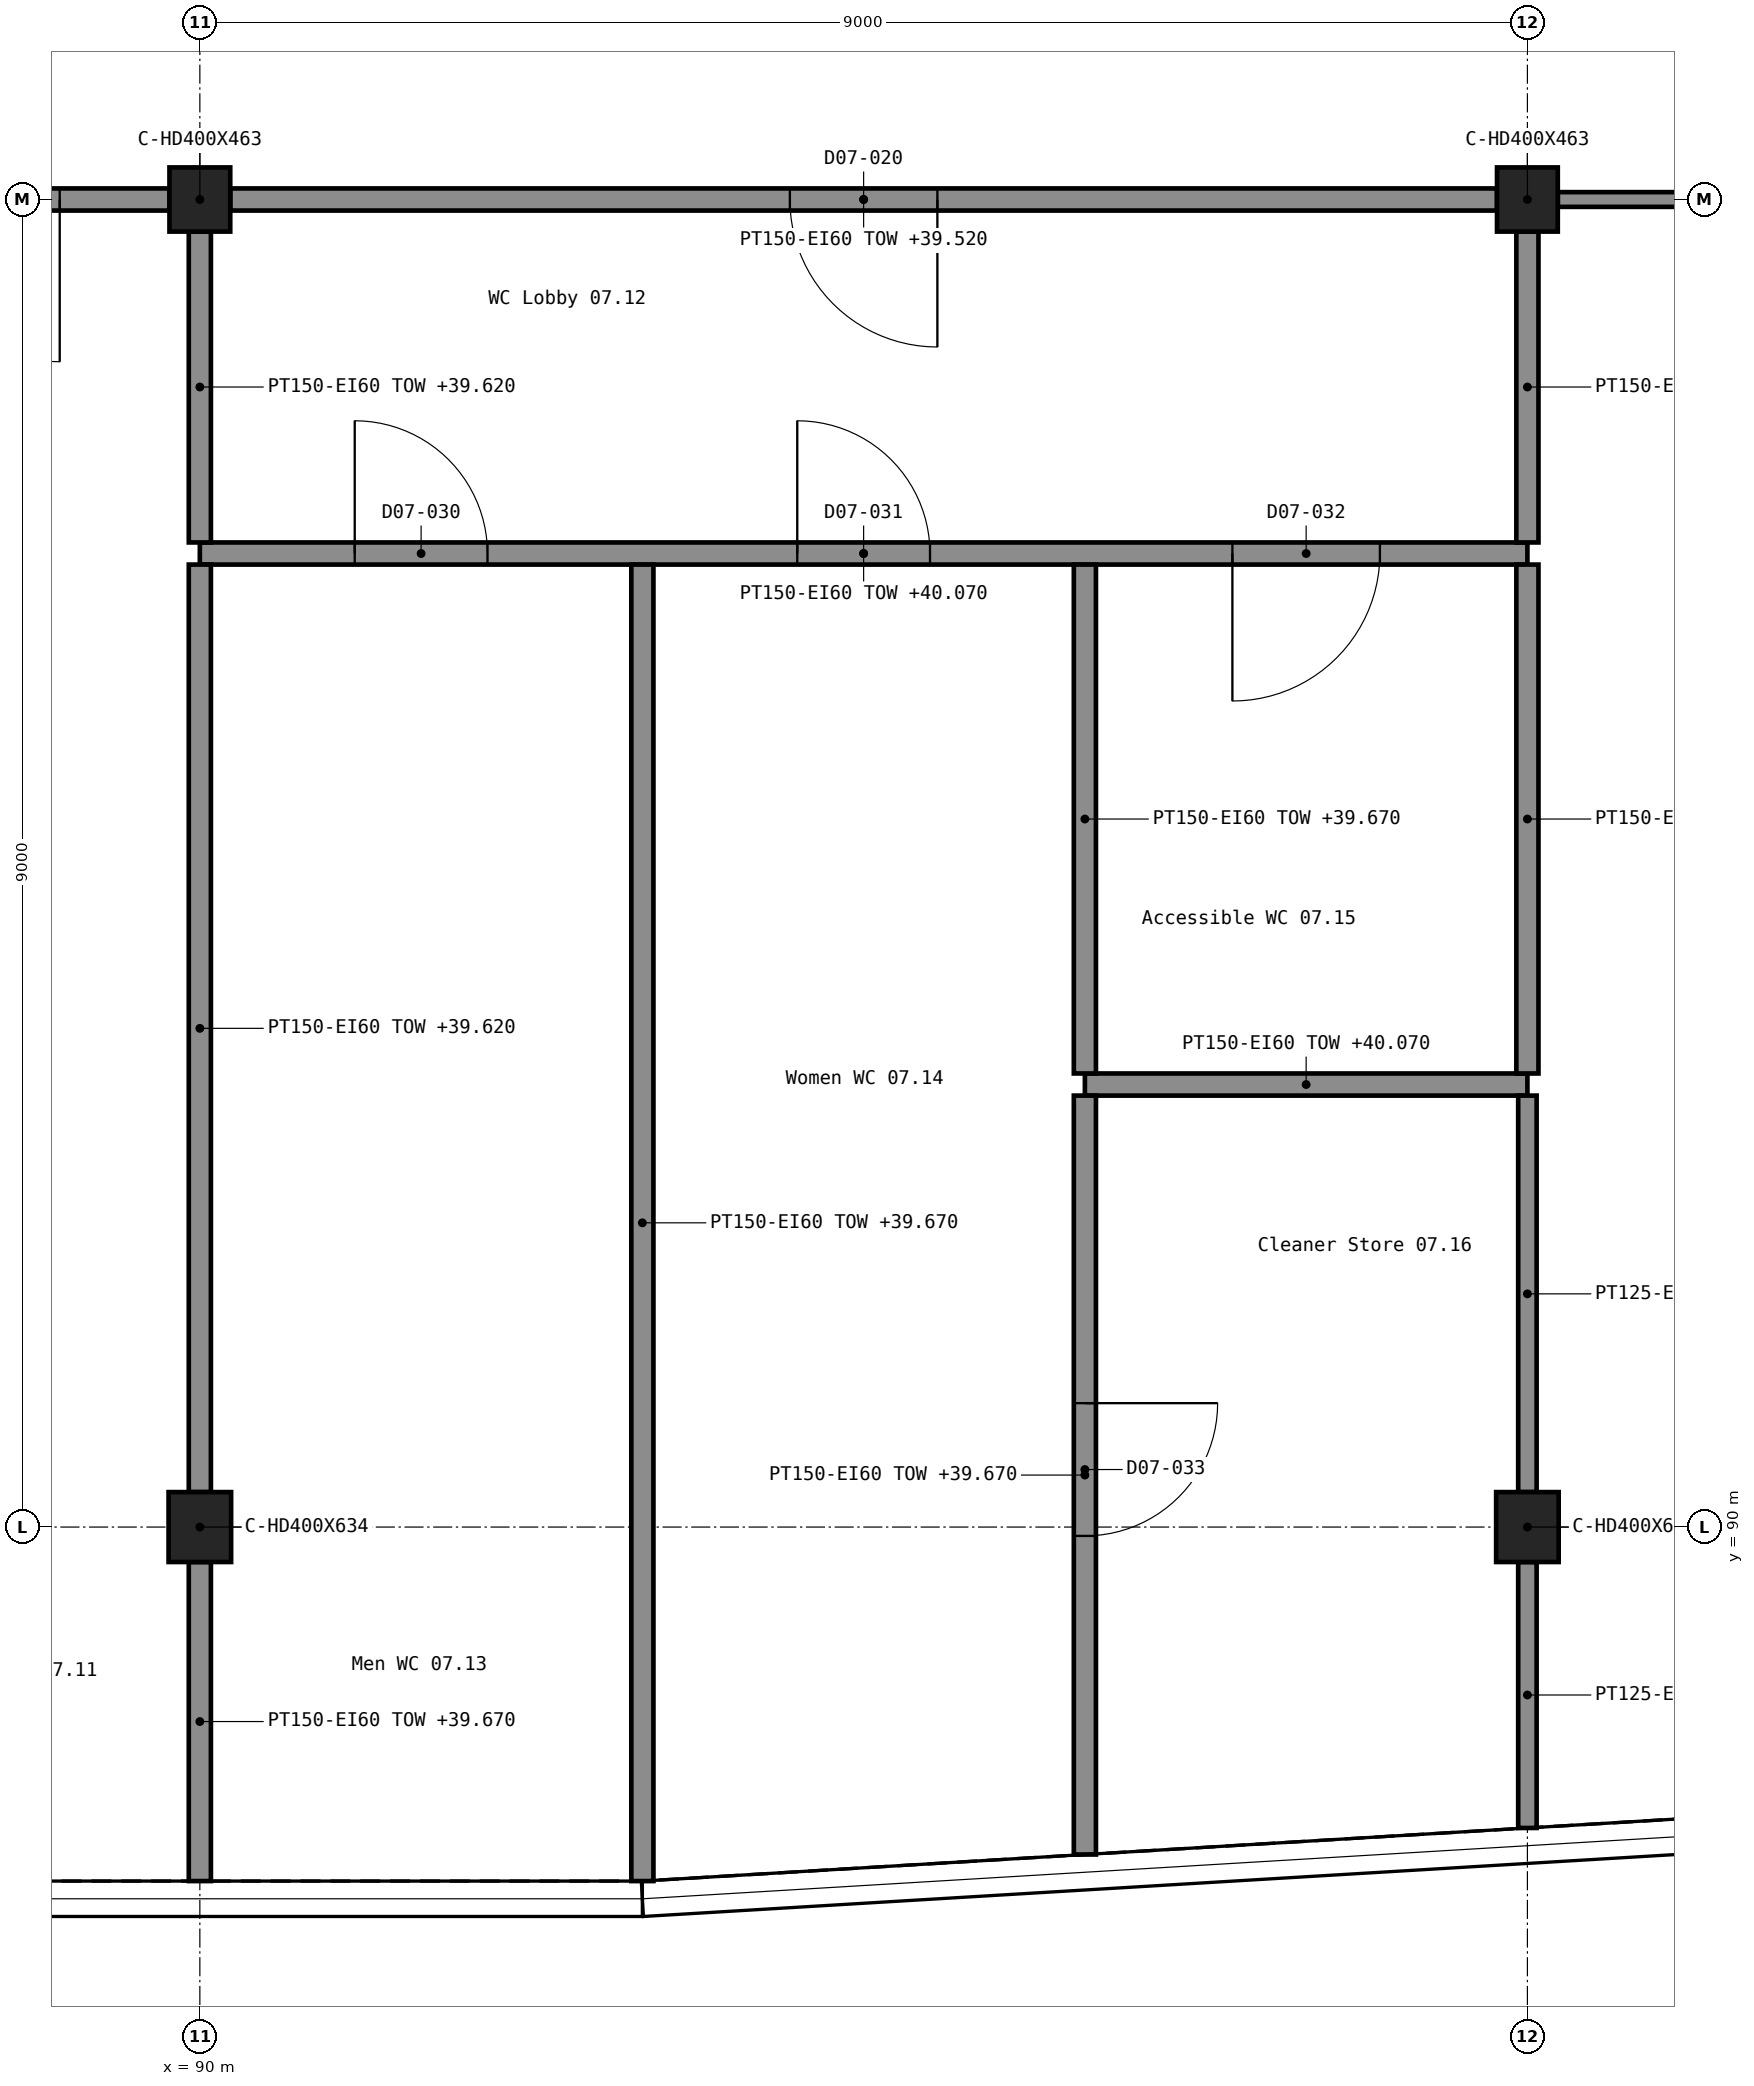
"""IFC4 building model, lengths in metres.
Left out: names, types, materials, properties, quantities, classifications, styles, units other than length and angle.
Written with IfcOpenShell. Run it as: python <this file> out.ifc"""

import sys

from ifc_helpers import new_model, si_unit, direction, frame, frame_2d, origin, origin_2d, place, context, subcontext, project, spatial, rectangle, i_section, extrude, element, fill, save


model = new_model("IFC4")
c1 = context("Model", 3, precision=1e-05, world=origin(), true_north=direction((0.0, 1.0)))
c2 = subcontext(c1, "Body", "Model", "MODEL_VIEW")
j1 = project(units=[si_unit("LENGTHUNIT", "METRE"), si_unit("PLANEANGLEUNIT", "RADIAN")], contexts=[c1])
p1 = place(None, origin())
s1 = spatial("IfcSite", under=j1, at=p1, CompositionType="ELEMENT")
p2 = place(p1, origin())
s2 = spatial("IfcBuilding", under=s1, at=p2, CompositionType="ELEMENT")
p3 = place(p2, frame((0.0, 0.0, 36.3)))
s3 = spatial("IfcBuildingStorey", under=s2, at=p3, CompositionType="ELEMENT", Elevation=36.3)
for number, where, z_axis, x_axis in (
    (1, (90.0, 90.0, 0.0), (0.0, 0.0, 1.0), (1.0, 0.0, 0.0)),
    (2, (99.0, 90.0, 0.0), (0.0, 0.0, 1.0), (1.0, 0.0, 0.0)),
):
    element("IfcColumn", number, at=place(p3, frame(where, z_axis=z_axis, x_axis=x_axis)), inside=s3, PredefinedType="COLUMN", context=c2, shape_type="SweptSolid", body=[
        extrude(i_section(OverallWidth=0.424, OverallDepth=0.474, WebThickness=0.048, FlangeThickness=0.077, FilletRadius=0.015, at=origin_2d()), origin(), (0.0, 0.0, 1.0), 3.9),
    ])
for number, where, z_axis, x_axis in (
    (3, (90.0, 99.0, 0.0), (0.0, 0.0, 1.0), (1.0, 0.0, 0.0)),
    (4, (99.0, 99.0, 0.0), (0.0, 0.0, 1.0), (1.0, 0.0, 0.0)),
):
    element("IfcColumn", number, at=place(p3, frame(where, z_axis=z_axis, x_axis=x_axis)), inside=s3, PredefinedType="COLUMN", context=c2, shape_type="SweptSolid", body=[
        extrude(i_section(OverallWidth=0.412, OverallDepth=0.435, WebThickness=0.036, FlangeThickness=0.057, FilletRadius=0.015, at=origin_2d()), origin(), (0.0, 0.0, 1.0), 3.9),
    ])
p4 = place(p3, frame((96.0, 93.0, 0.0), z_axis=(0.0, 0.0, 1.0), x_axis=(1.0, 0.0, 0.0)))
e5 = element("IfcWall", 5, at=p4, inside=s3, PredefinedType="PARTITIONING", context=c2, shape_type="SweptSolid", body=[
    extrude(rectangle(XDim=3.0, YDim=0.15, at=frame_2d((1.5, 0.0))), origin(), (0.0, 0.0, 1.0), 3.77),
])
p5 = place(p3, frame((90.0, 96.6, 0.0), z_axis=(0.0, 0.0, 1.0), x_axis=(1.0, 0.0, 0.0)))
e6 = element("IfcWall", 6, at=p5, inside=s3, PredefinedType="PARTITIONING", context=c2, shape_type="SweptSolid", body=[
    extrude(rectangle(XDim=9.0, YDim=0.15, at=frame_2d((4.5, 0.0))), origin(), (0.0, 0.0, 1.0), 3.77),
])
p6 = place(p5, frame((1.05, 0.0, 0.0)))
e7 = element("IfcOpeningElement", 7, at=p6, cuts=e6, PredefinedType="OPENING", context=c2, shape_type="SweptSolid", body=[
    extrude(rectangle(XDim=0.9, YDim=2.1, at=frame_2d((0.45, 1.05))), frame((0.0, 0.086, 0.0), z_axis=(0.0, -1.0, 0.0), x_axis=(1.0, 0.0, 0.0)), (0.0, 0.0, 1.0), 0.172),
])
p7 = place(p5, frame((4.05, 0.0, 0.0)))
e8 = element("IfcOpeningElement", 8, at=p7, cuts=e6, PredefinedType="OPENING", context=c2, shape_type="SweptSolid", body=[
    extrude(rectangle(XDim=0.9, YDim=2.1, at=frame_2d((0.45, 1.05))), frame((0.0, 0.086, 0.0), z_axis=(0.0, -1.0, 0.0), x_axis=(1.0, 0.0, 0.0)), (0.0, 0.0, 1.0), 0.172),
])
p8 = place(p5, frame((7.0, 0.0, 0.0)))
e9 = element("IfcOpeningElement", 9, at=p8, cuts=e6, PredefinedType="OPENING", context=c2, shape_type="SweptSolid", body=[
    extrude(rectangle(XDim=1.0, YDim=2.1, at=frame_2d((0.5, 1.05))), frame((0.0, 0.086, 0.0), z_axis=(0.0, -1.0, 0.0), x_axis=(1.0, 0.0, 0.0)), (0.0, 0.0, 1.0), 0.172),
])
p9 = place(p3, frame((99.206, 99.0, 0.0), z_axis=(0.0, 0.0, 1.0), x_axis=(1.0, 0.0, 0.0)))
e10 = element("IfcWall", 10, at=p9, inside=s3, PredefinedType="PARTITIONING", context=c2, shape_type="SweptSolid", body=[
    extrude(rectangle(XDim=5.794, YDim=0.1, at=frame_2d((2.897, 0.0))), origin(), (0.0, 0.0, 1.0), 3.22),
])
p10 = place(p9, frame((2.294, 0.0, 0.0)))
e11 = element("IfcOpeningElement", 11, at=p10, cuts=e10, PredefinedType="OPENING", context=c2, shape_type="SweptSolid", body=[
    extrude(rectangle(XDim=1.0, YDim=2.1, at=frame_2d((0.5, 1.05))), frame((0.0, 0.061, 0.0), z_axis=(0.0, -1.0, 0.0), x_axis=(1.0, 0.0, 0.0)), (0.0, 0.0, 1.0), 0.122),
])
p11 = place(p3, frame((81.206, 99.0, 0.0), z_axis=(0.0, 0.0, 1.0), x_axis=(1.0, 0.0, 0.0)))
e12 = element("IfcWall", 12, at=p11, inside=s3, PredefinedType="PARTITIONING", context=c2, shape_type="SweptSolid", body=[
    extrude(rectangle(XDim=8.588, YDim=0.15, at=frame_2d((4.294, 0.0))), origin(), (0.0, 0.0, 1.0), 3.22),
])
p12 = place(p11, frame((1.369, 0.0, 0.0)))
e13 = element("IfcOpeningElement", 13, at=p12, cuts=e12, PredefinedType="OPENING", context=c2, shape_type="SweptSolid", body=[
    extrude(rectangle(XDim=1.1, YDim=2.4, at=frame_2d((0.55, 1.2))), frame((0.0, 0.086, 0.0), z_axis=(0.0, -1.0, 0.0), x_axis=(1.0, 0.0, 0.0)), (0.0, 0.0, 1.0), 0.172),
])
p13 = place(p11, frame((6.744, 0.0, 0.0)))
e14 = element("IfcOpeningElement", 14, at=p13, cuts=e12, PredefinedType="OPENING", context=c2, shape_type="SweptSolid", body=[
    extrude(rectangle(XDim=1.1, YDim=2.4, at=frame_2d((0.55, 1.2))), frame((0.0, 0.086, 0.0), z_axis=(0.0, -1.0, 0.0), x_axis=(1.0, 0.0, 0.0)), (0.0, 0.0, 1.0), 0.172),
])
p14 = place(p3, frame((90.206, 99.0, 0.0), z_axis=(0.0, 0.0, 1.0), x_axis=(1.0, 0.0, 0.0)))
e15 = element("IfcWall", 15, at=p14, inside=s3, PredefinedType="PARTITIONING", context=c2, shape_type="SweptSolid", body=[
    extrude(rectangle(XDim=8.588, YDim=0.15, at=frame_2d((4.294, 0.0))), origin(), (0.0, 0.0, 1.0), 3.22),
])
p15 = place(p14, frame((3.794, 0.0, 0.0)))
e16 = element("IfcOpeningElement", 16, at=p15, cuts=e15, PredefinedType="OPENING", context=c2, shape_type="SweptSolid", body=[
    extrude(rectangle(XDim=1.0, YDim=2.1, at=frame_2d((0.5, 1.05))), frame((0.0, 0.086, 0.0), z_axis=(0.0, -1.0, 0.0), x_axis=(1.0, 0.0, 0.0)), (0.0, 0.0, 1.0), 0.172),
])
p16 = place(p3, frame((90.0, 87.6, 0.0), z_axis=(0.0, 0.0, 1.0), x_axis=(0.0, 1.0, 0.0)))
e17 = element("IfcWall", 17, at=p16, inside=s3, PredefinedType="PARTITIONING", context=c2, shape_type="SweptSolid", body=[
    extrude(rectangle(XDim=2.163, YDim=0.15, at=frame_2d((1.082, 0.0))), origin(), (0.0, 0.0, 1.0), 3.37),
])
p17 = place(p3, frame((90.0, 90.237, 0.0), z_axis=(0.0, 0.0, 1.0), x_axis=(0.0, 1.0, 0.0)))
e18 = element("IfcWall", 18, at=p17, inside=s3, PredefinedType="PARTITIONING", context=c2, shape_type="SweptSolid", body=[
    extrude(rectangle(XDim=6.288, YDim=0.15, at=frame_2d((3.144, 0.0))), origin(), (0.0, 0.0, 1.0), 3.32),
])
p18 = place(p3, frame((90.0, 96.675, 0.0), z_axis=(0.0, 0.0, 1.0), x_axis=(0.0, 1.0, 0.0)))
e19 = element("IfcWall", 19, at=p18, inside=s3, PredefinedType="PARTITIONING", context=c2, shape_type="SweptSolid", body=[
    extrude(rectangle(XDim=2.107, YDim=0.15, at=frame_2d((1.054, 0.0))), origin(), (0.0, 0.0, 1.0), 3.32),
])
p19 = place(p3, frame((93.0, 87.6, 0.0), z_axis=(0.0, 0.0, 1.0), x_axis=(0.0, 1.0, 0.0)))
e20 = element("IfcWall", 20, at=p19, inside=s3, PredefinedType="PARTITIONING", context=c2, shape_type="SweptSolid", body=[
    extrude(rectangle(XDim=8.925, YDim=0.15, at=frame_2d((4.462, 0.0))), origin(), (0.0, 0.0, 1.0), 3.37),
])
p20 = place(p3, frame((96.0, 87.78, 0.0), z_axis=(0.0, 0.0, 1.0), x_axis=(0.0, 1.0, 0.0)))
e21 = element("IfcWall", 21, at=p20, inside=s3, PredefinedType="PARTITIONING", context=c2, shape_type="SweptSolid", body=[
    extrude(rectangle(XDim=5.145, YDim=0.15, at=frame_2d((2.573, 0.0))), origin(), (0.0, 0.0, 1.0), 3.37),
])
p21 = place(p20, frame((2.16, 0.0, 0.0)))
e22 = element("IfcOpeningElement", 22, at=p21, cuts=e21, PredefinedType="OPENING", context=c2, shape_type="SweptSolid", body=[
    extrude(rectangle(XDim=0.9, YDim=2.1, at=frame_2d((0.45, 1.05))), frame((0.0, 0.086, 0.0), z_axis=(0.0, -1.0, 0.0), x_axis=(1.0, 0.0, 0.0)), (0.0, 0.0, 1.0), 0.172),
])
p22 = place(p3, frame((96.0, 93.075, 0.0), z_axis=(0.0, 0.0, 1.0), x_axis=(0.0, 1.0, 0.0)))
e23 = element("IfcWall", 23, at=p22, inside=s3, PredefinedType="PARTITIONING", context=c2, shape_type="SweptSolid", body=[
    extrude(rectangle(XDim=3.45, YDim=0.15, at=frame_2d((1.725, 0.0))), origin(), (0.0, 0.0, 1.0), 3.37),
])
p23 = place(p3, frame((99.0, 87.96, 0.0), z_axis=(0.0, 0.0, 1.0), x_axis=(0.0, 1.0, 0.0)))
e24 = element("IfcWall", 24, at=p23, inside=s3, PredefinedType="PARTITIONING", context=c2, shape_type="SweptSolid", body=[
    extrude(rectangle(XDim=1.803, YDim=0.125, at=frame_2d((0.901, 0.0))), origin(), (0.0, 0.0, 1.0), 3.37),
])
p24 = place(p3, frame((99.0, 90.237, 0.0), z_axis=(0.0, 0.0, 1.0), x_axis=(0.0, 1.0, 0.0)))
e25 = element("IfcWall", 25, at=p24, inside=s3, PredefinedType="PARTITIONING", context=c2, shape_type="SweptSolid", body=[
    extrude(rectangle(XDim=2.688, YDim=0.125, at=frame_2d((1.344, 0.0))), origin(), (0.0, 0.0, 1.0), 3.32),
])
p25 = place(p3, frame((99.0, 93.075, 0.0), z_axis=(0.0, 0.0, 1.0), x_axis=(0.0, 1.0, 0.0)))
e26 = element("IfcWall", 26, at=p25, inside=s3, PredefinedType="PARTITIONING", context=c2, shape_type="SweptSolid", body=[
    extrude(rectangle(XDim=3.45, YDim=0.15, at=frame_2d((1.725, 0.0))), origin(), (0.0, 0.0, 1.0), 3.32),
])
p26 = place(p3, frame((99.0, 96.675, 0.0), z_axis=(0.0, 0.0, 1.0), x_axis=(0.0, 1.0, 0.0)))
e27 = element("IfcWall", 27, at=p26, inside=s3, PredefinedType="PARTITIONING", context=c2, shape_type="SweptSolid", body=[
    extrude(rectangle(XDim=2.107, YDim=0.15, at=frame_2d((1.054, 0.0))), origin(), (0.0, 0.0, 1.0), 3.32),
])
p27 = place(p13, frame((1.1, 0.0, 0.0), z_axis=(0.0, 0.0, 1.0), x_axis=(-1.0, 0.0, 0.0)))
e28 = element("IfcDoor", 28, at=p27, inside=s3, OperationType="SINGLE_SWING_LEFT", PredefinedType="DOOR", context=c2, shape_type="SweptSolid", body=[
    extrude(rectangle(XDim=1.1, YDim=2.4, at=frame_2d((0.55, 1.2))), frame((0.0, 0.025, 0.0), z_axis=(0.0, -1.0, 0.0), x_axis=(1.0, 0.0, 0.0)), (0.0, 0.0, 1.0), 0.05),
])
fill(e14, e28)
p28 = place(p15, frame((1.0, 0.0, 0.0), z_axis=(0.0, 0.0, 1.0), x_axis=(-1.0, 0.0, 0.0)))
e29 = element("IfcDoor", 29, at=p28, inside=s3, OperationType="SINGLE_SWING_LEFT", PredefinedType="DOOR", context=c2, shape_type="SweptSolid", body=[
    extrude(rectangle(XDim=1.0, YDim=2.1, at=frame_2d((0.5, 1.05))), frame((0.0, 0.025, 0.0), z_axis=(0.0, -1.0, 0.0), x_axis=(1.0, 0.0, 0.0)), (0.0, 0.0, 1.0), 0.05),
])
fill(e16, e29)
p29 = place(p6, origin())
e30 = element("IfcDoor", 30, at=p29, inside=s3, OperationType="SINGLE_SWING_LEFT", PredefinedType="DOOR", context=c2, shape_type="SweptSolid", body=[
    extrude(rectangle(XDim=0.9, YDim=2.1, at=frame_2d((0.45, 1.05))), frame((0.0, 0.025, 0.0), z_axis=(0.0, -1.0, 0.0), x_axis=(1.0, 0.0, 0.0)), (0.0, 0.0, 1.0), 0.05),
])
fill(e7, e30)
p30 = place(p7, origin())
e31 = element("IfcDoor", 31, at=p30, inside=s3, OperationType="SINGLE_SWING_LEFT", PredefinedType="DOOR", context=c2, shape_type="SweptSolid", body=[
    extrude(rectangle(XDim=0.9, YDim=2.1, at=frame_2d((0.45, 1.05))), frame((0.0, 0.025, 0.0), z_axis=(0.0, -1.0, 0.0), x_axis=(1.0, 0.0, 0.0)), (0.0, 0.0, 1.0), 0.05),
])
fill(e8, e31)
p31 = place(p8, frame((1.0, 0.0, 0.0), z_axis=(0.0, 0.0, 1.0), x_axis=(-1.0, 0.0, 0.0)))
e32 = element("IfcDoor", 32, at=p31, inside=s3, OperationType="SINGLE_SWING_RIGHT", PredefinedType="DOOR", context=c2, shape_type="SweptSolid", body=[
    extrude(rectangle(XDim=1.0, YDim=2.1, at=frame_2d((0.5, 1.05))), frame((0.0, 0.025, 0.0), z_axis=(0.0, -1.0, 0.0), x_axis=(1.0, 0.0, 0.0)), (0.0, 0.0, 1.0), 0.05),
])
fill(e9, e32)
p32 = place(p21, frame((0.9, 0.0, 0.0), z_axis=(0.0, 0.0, 1.0), x_axis=(-1.0, 0.0, 0.0)))
e33 = element("IfcDoor", 33, at=p32, inside=s3, OperationType="SINGLE_SWING_LEFT", PredefinedType="DOOR", context=c2, shape_type="SweptSolid", body=[
    extrude(rectangle(XDim=0.9, YDim=2.1, at=frame_2d((0.45, 1.05))), frame((0.0, 0.025, 0.0), z_axis=(0.0, -1.0, 0.0), x_axis=(1.0, 0.0, 0.0)), (0.0, 0.0, 1.0), 0.05),
])
fill(e22, e33)
save(model, sys.argv[1])
